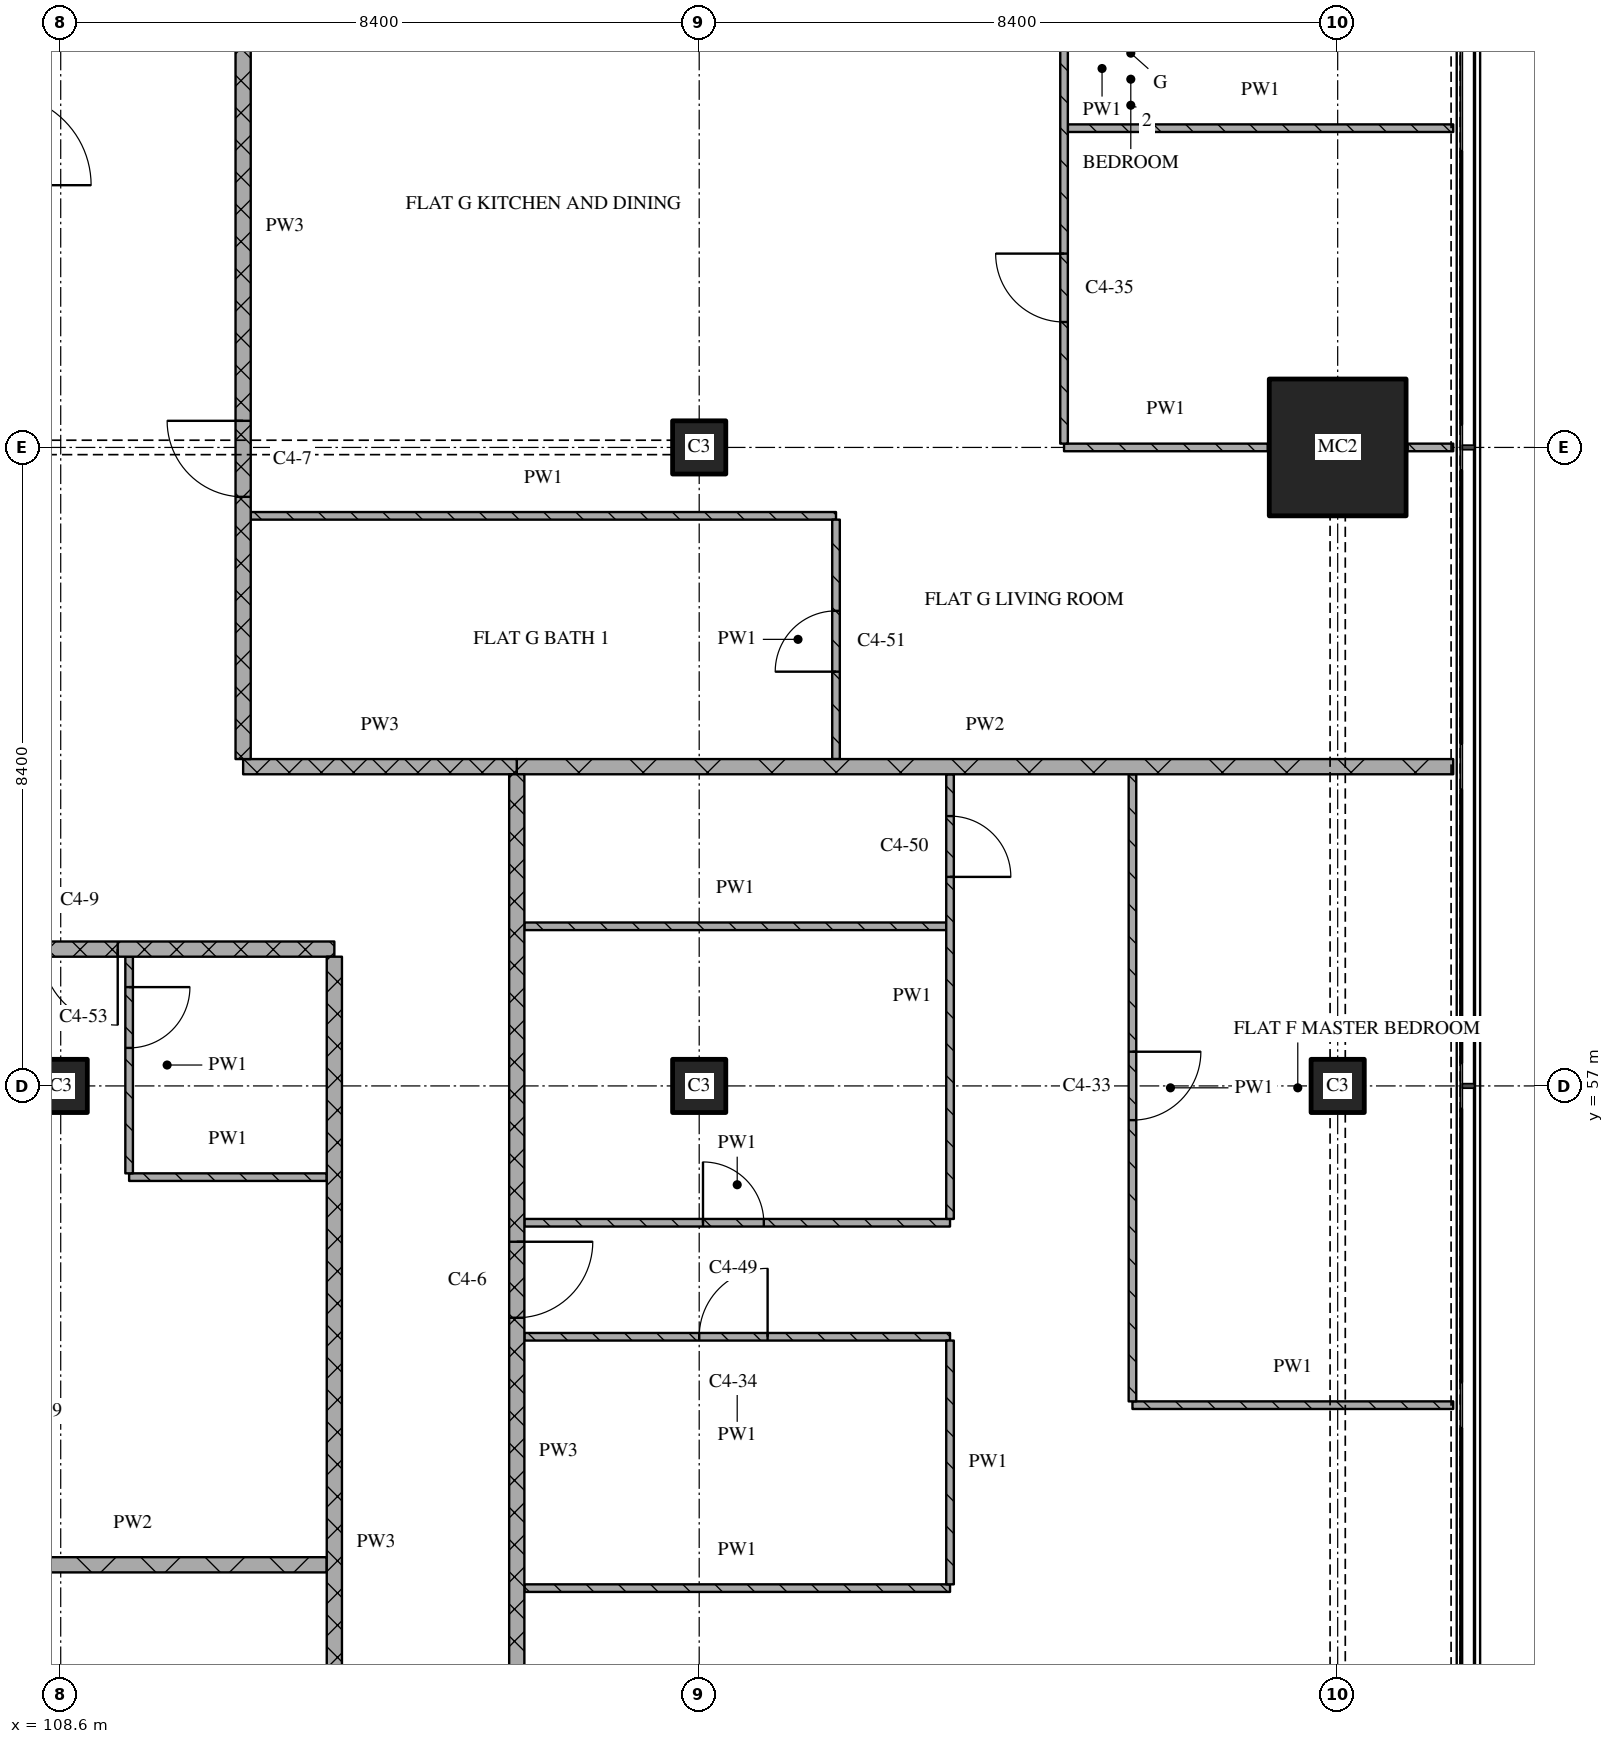
"""IFC4 building model, lengths in metres.
Left out: names, types, materials, properties, quantities, classifications, styles, units other than length and angle.
Written with IfcOpenShell. Run it as: python <this file> out.ifc"""

import sys

from ifc_helpers import new_model, si_unit, direction, frame, frame_2d, origin, origin_2d, place, context, subcontext, project, spatial, rectangle, extrude, element, fill, save


model = new_model("IFC4")
c1 = context("Model", 3, precision=1e-05, world=origin(), true_north=direction((0.0, 1.0)))
c2 = subcontext(c1, "Body", "Model", "MODEL_VIEW")
j1 = project(units=[si_unit("LENGTHUNIT", "METRE"), si_unit("PLANEANGLEUNIT", "RADIAN")], contexts=[c1])
p1 = place(None, origin())
s1 = spatial("IfcSite", under=j1, at=p1, CompositionType="ELEMENT")
p2 = place(p1, origin())
s2 = spatial("IfcBuilding", under=s1, at=p2, CompositionType="ELEMENT")
p3 = place(p2, frame((0.0, 0.0, 187.05)))
s3 = spatial("IfcBuildingStorey", under=s2, at=p3, CompositionType="ELEMENT", Elevation=187.05)
for number, where, z_axis, x_axis in (
    (1, (108.6, 57.0, 0.0), (0.0, 0.0, 1.0), (1.0, 0.0, 0.0)),
    (2, (117.0, 57.0, 0.0), (0.0, 0.0, 1.0), (1.0, 0.0, 0.0)),
    (3, (117.0, 65.4, 0.0), (0.0, 0.0, 1.0), (1.0, 0.0, 0.0)),
    (4, (125.4, 57.0, 0.0), (0.0, 0.0, 1.0), (1.0, 0.0, 0.0)),
):
    element("IfcColumn", number, at=place(p3, frame(where, z_axis=z_axis, x_axis=x_axis)), inside=s3, PredefinedType="COLUMN", context=c2, shape_type="SweptSolid", body=[
        extrude(rectangle(XDim=0.7, YDim=0.7, at=origin_2d()), origin(), (0.0, 0.0, 1.0), 3.6),
    ])
p4 = place(p3, frame((125.4, 65.4, 0.0), z_axis=(0.0, 0.0, 1.0), x_axis=(1.0, 0.0, 0.0)))
e5 = element("IfcColumn", 5, at=p4, inside=s3, PredefinedType="COLUMN", context=c2, shape_type="SweptSolid", body=[
    extrude(rectangle(XDim=1.8, YDim=1.8, at=origin_2d()), origin(), (0.0, 0.0, 1.0), 3.6),
])
p5 = place(p3, frame((114.7, 50.393, 0.0), z_axis=(0.0, 0.0, 1.0), x_axis=(1.0, 0.0, 0.0)))
e6 = element("IfcWall", 6, at=p5, inside=s3, PredefinedType="PARTITIONING", context=c2, shape_type="SweptSolid", body=[
    extrude(rectangle(XDim=5.6, YDim=0.1, at=frame_2d((2.8, 0.0))), origin(), (0.0, 0.0, 1.0), 3.32),
])
p6 = place(p3, frame((107.0, 50.7, 0.0), z_axis=(0.0, 0.0, 1.0), x_axis=(1.0, 0.0, 0.0)))
e7 = element("IfcWall", 7, at=p6, inside=s3, PredefinedType="PARTITIONING", context=c2, shape_type="SweptSolid", body=[
    extrude(rectangle(XDim=5.1, YDim=0.2, at=frame_2d((2.55, 0.0))), origin(), (0.0, 0.0, 1.0), 3.32),
])
p7 = place(p3, frame((122.7, 52.8, 0.0), z_axis=(0.0, 0.0, 1.0), x_axis=(1.0, 0.0, 0.0)))
e8 = element("IfcWall", 8, at=p7, inside=s3, PredefinedType="PARTITIONING", context=c2, shape_type="SweptSolid", body=[
    extrude(rectangle(XDim=4.22, YDim=0.1, at=frame_2d((2.11, 0.0))), origin(), (0.0, 0.0, 1.0), 3.32),
])
p8 = place(p3, frame((120.3, 53.7, 0.0), z_axis=(0.0, 0.0, 1.0), x_axis=(-1.0, 0.0, 0.0)))
e9 = element("IfcWall", 9, at=p8, inside=s3, PredefinedType="PARTITIONING", context=c2, shape_type="SweptSolid", body=[
    extrude(rectangle(XDim=5.6, YDim=0.1, at=frame_2d((2.8, 0.0))), origin(), (0.0, 0.0, 1.0), 3.32),
])
p9 = place(p8, frame((2.4, 0.0, 0.0)))
e10 = element("IfcOpeningElement", 10, at=p9, cuts=e9, PredefinedType="OPENING", context=c2, shape_type="SweptSolid", body=[
    extrude(rectangle(XDim=0.9, YDim=2.1, at=frame_2d((0.45, 1.05))), frame((0.0, 0.06, 0.0), z_axis=(0.0, -1.0, 0.0), x_axis=(1.0, 0.0, 0.0)), (0.0, 0.0, 1.0), 0.12),
])
p10 = place(p3, frame((114.7, 55.2, 0.0), z_axis=(0.0, 0.0, 1.0), x_axis=(1.0, 0.0, 0.0)))
e11 = element("IfcWall", 11, at=p10, inside=s3, PredefinedType="PARTITIONING", context=c2, shape_type="SweptSolid", body=[
    extrude(rectangle(XDim=5.6, YDim=0.1, at=frame_2d((2.8, 0.0))), origin(), (0.0, 0.0, 1.0), 3.32),
])
p11 = place(p10, frame((2.35, 0.0, 0.0)))
e12 = element("IfcOpeningElement", 12, at=p11, cuts=e11, PredefinedType="OPENING", context=c2, shape_type="SweptSolid", body=[
    extrude(rectangle(XDim=0.8, YDim=2.1, at=frame_2d((0.4, 1.05))), frame((0.0, 0.06, 0.0), z_axis=(0.0, -1.0, 0.0), x_axis=(1.0, 0.0, 0.0)), (0.0, 0.0, 1.0), 0.12),
])
p12 = place(p3, frame((109.5, 55.8, 0.0), z_axis=(0.0, 0.0, 1.0), x_axis=(1.0, 0.0, 0.0)))
e13 = element("IfcWall", 13, at=p12, inside=s3, PredefinedType="PARTITIONING", context=c2, shape_type="SweptSolid", body=[
    extrude(rectangle(XDim=2.6, YDim=0.1, at=frame_2d((1.3, 0.0))), origin(), (0.0, 0.0, 1.0), 3.32),
])
p13 = place(p3, frame((112.2, 58.8, 0.0), z_axis=(0.0, 0.0, 1.0), x_axis=(-1.0, 0.0, 0.0)))
e14 = element("IfcWall", 14, at=p13, inside=s3, PredefinedType="PARTITIONING", context=c2, shape_type="SweptSolid", body=[
    extrude(rectangle(XDim=10.8, YDim=0.2, at=frame_2d((5.4, 0.0))), origin(), (0.0, 0.0, 1.0), 3.32),
])
p14 = place(p13, frame((2.85, 0.0, 0.0)))
e15 = element("IfcOpeningElement", 15, at=p14, cuts=e14, PredefinedType="OPENING", context=c2, shape_type="SweptSolid", body=[
    extrude(rectangle(XDim=1.0, YDim=2.1, at=frame_2d((0.5, 1.05))), frame((0.0, 0.11, 0.0), z_axis=(0.0, -1.0, 0.0), x_axis=(1.0, 0.0, 0.0)), (0.0, 0.0, 1.0), 0.22),
])
p15 = place(p3, frame((114.7, 59.1, 0.0), z_axis=(0.0, 0.0, 1.0), x_axis=(1.0, 0.0, 0.0)))
e16 = element("IfcWall", 16, at=p15, inside=s3, PredefinedType="PARTITIONING", context=c2, shape_type="SweptSolid", body=[
    extrude(rectangle(XDim=5.55, YDim=0.1, at=frame_2d((2.775, 0.0))), origin(), (0.0, 0.0, 1.0), 3.32),
])
p16 = place(p3, frame((111.0, 61.2, 0.0), z_axis=(0.0, 0.0, 1.0), x_axis=(1.0, 0.0, 0.0)))
e17 = element("IfcWall", 17, at=p16, inside=s3, PredefinedType="PARTITIONING", context=c2, shape_type="SweptSolid", body=[
    extrude(rectangle(XDim=3.6, YDim=0.2, at=frame_2d((1.8, 0.0))), origin(), (0.0, 0.0, 1.0), 3.32),
])
p17 = place(p3, frame((114.6, 61.2, 0.0), z_axis=(0.0, 0.0, 1.0), x_axis=(1.0, 0.0, 0.0)))
e18 = element("IfcWall", 18, at=p17, inside=s3, PredefinedType="PARTITIONING", context=c2, shape_type="SweptSolid", body=[
    extrude(rectangle(XDim=12.32, YDim=0.2, at=frame_2d((6.16, 0.0))), origin(), (0.0, 0.0, 1.0), 3.32),
])
p18 = place(p3, frame((111.1, 64.5, 0.0), z_axis=(0.0, 0.0, 1.0), x_axis=(1.0, 0.0, 0.0)))
e19 = element("IfcWall", 19, at=p18, inside=s3, PredefinedType="PARTITIONING", context=c2, shape_type="SweptSolid", body=[
    extrude(rectangle(XDim=7.7, YDim=0.1, at=frame_2d((3.85, 0.0))), origin(), (0.0, 0.0, 1.0), 3.32),
])
p19 = place(p3, frame((121.8, 65.4, 0.0), z_axis=(0.0, 0.0, 1.0), x_axis=(1.0, 0.0, 0.0)))
e20 = element("IfcWall", 20, at=p19, inside=s3, PredefinedType="PARTITIONING", context=c2, shape_type="SweptSolid", body=[
    extrude(rectangle(XDim=2.68, YDim=0.1, at=frame_2d((1.34, 0.0))), origin(), (0.0, 0.0, 1.0), 3.32),
])
p20 = place(p3, frame((126.32, 65.4, 0.0), z_axis=(0.0, 0.0, 1.0), x_axis=(1.0, 0.0, 0.0)))
e21 = element("IfcWall", 21, at=p20, inside=s3, PredefinedType="PARTITIONING", context=c2, shape_type="SweptSolid", body=[
    extrude(rectangle(XDim=0.6, YDim=0.1, at=frame_2d((0.3, 0.0))), origin(), (0.0, 0.0, 1.0), 3.32),
])
p21 = place(p3, frame((121.85, 69.6, 0.0), z_axis=(0.0, 0.0, 1.0), x_axis=(1.0, 0.0, 0.0)))
e22 = element("IfcWall", 22, at=p21, inside=s3, PredefinedType="PARTITIONING", context=c2, shape_type="SweptSolid", body=[
    extrude(rectangle(XDim=5.07, YDim=0.1, at=frame_2d((2.535, 0.0))), origin(), (0.0, 0.0, 1.0), 3.32),
])
p22 = place(p3, frame((109.5, 58.7, 0.0), z_axis=(0.0, 0.0, 1.0), x_axis=(0.0, -1.0, 0.0)))
e23 = element("IfcWall", 23, at=p22, inside=s3, PredefinedType="PARTITIONING", context=c2, shape_type="SweptSolid", body=[
    extrude(rectangle(XDim=2.85, YDim=0.1, at=frame_2d((1.425, 0.0))), origin(), (0.0, 0.0, 1.0), 3.32),
])
p23 = place(p22, frame((0.4, 0.0, 0.0)))
e24 = element("IfcOpeningElement", 24, at=p23, cuts=e23, PredefinedType="OPENING", context=c2, shape_type="SweptSolid", body=[
    extrude(rectangle(XDim=0.8, YDim=2.1, at=frame_2d((0.4, 1.05))), frame((0.0, 0.06, 0.0), z_axis=(0.0, -1.0, 0.0), x_axis=(1.0, 0.0, 0.0)), (0.0, 0.0, 1.0), 0.12),
])
p24 = place(p3, frame((111.0, 75.32, 0.0), z_axis=(0.0, 0.0, 1.0), x_axis=(0.0, -1.0, 0.0)))
e25 = element("IfcWall", 25, at=p24, inside=s3, PredefinedType="PARTITIONING", context=c2, shape_type="SweptSolid", body=[
    extrude(rectangle(XDim=14.02, YDim=0.2, at=frame_2d((7.01, 0.0))), origin(), (0.0, 0.0, 1.0), 3.32),
])
p25 = place(p24, frame((9.57, 0.0, 0.0)))
e26 = element("IfcOpeningElement", 26, at=p25, cuts=e25, PredefinedType="OPENING", context=c2, shape_type="SweptSolid", body=[
    extrude(rectangle(XDim=1.0, YDim=2.1, at=frame_2d((0.5, 1.05))), frame((0.0, 0.11, 0.0), z_axis=(0.0, -1.0, 0.0), x_axis=(1.0, 0.0, 0.0)), (0.0, 0.0, 1.0), 0.22),
])
p26 = place(p3, frame((112.2, 58.7, 0.0), z_axis=(0.0, 0.0, 1.0), x_axis=(0.0, -1.0, 0.0)))
e27 = element("IfcWall", 27, at=p26, inside=s3, PredefinedType="PARTITIONING", context=c2, shape_type="SweptSolid", body=[
    extrude(rectangle(XDim=15.4, YDim=0.2, at=frame_2d((7.7, 0.0))), origin(), (0.0, 0.0, 1.0), 3.32),
])
p27 = place(p3, frame((114.6, 61.1, 0.0), z_axis=(0.0, 0.0, 1.0), x_axis=(0.0, -1.0, 0.0)))
e28 = element("IfcWall", 28, at=p27, inside=s3, PredefinedType="PARTITIONING", context=c2, shape_type="SweptSolid", body=[
    extrude(rectangle(XDim=17.8, YDim=0.2, at=frame_2d((8.9, 0.0))), origin(), (0.0, 0.0, 1.0), 3.32),
])
p28 = place(p27, frame((6.15, 0.0, 0.0)))
e29 = element("IfcOpeningElement", 29, at=p28, cuts=e28, PredefinedType="OPENING", context=c2, shape_type="SweptSolid", body=[
    extrude(rectangle(XDim=1.0, YDim=2.1, at=frame_2d((0.5, 1.05))), frame((0.0, 0.11, 0.0), z_axis=(0.0, -1.0, 0.0), x_axis=(1.0, 0.0, 0.0)), (0.0, 0.0, 1.0), 0.22),
])
p29 = place(p3, frame((118.8, 61.3, 0.0), z_axis=(0.0, 0.0, 1.0), x_axis=(0.0, 1.0, 0.0)))
e30 = element("IfcWall", 30, at=p29, inside=s3, PredefinedType="PARTITIONING", context=c2, shape_type="SweptSolid", body=[
    extrude(rectangle(XDim=3.15, YDim=0.1, at=frame_2d((1.575, 0.0))), origin(), (0.0, 0.0, 1.0), 3.32),
])
p30 = place(p29, frame((1.15, 0.0, 0.0)))
e31 = element("IfcOpeningElement", 31, at=p30, cuts=e30, PredefinedType="OPENING", context=c2, shape_type="SweptSolid", body=[
    extrude(rectangle(XDim=0.8, YDim=2.1, at=frame_2d((0.4, 1.05))), frame((0.0, 0.06, 0.0), z_axis=(0.0, -1.0, 0.0), x_axis=(1.0, 0.0, 0.0)), (0.0, 0.0, 1.0), 0.12),
])
p31 = place(p3, frame((120.3, 53.65, 0.0), z_axis=(0.0, 0.0, 1.0), x_axis=(0.0, -1.0, 0.0)))
e32 = element("IfcWall", 32, at=p31, inside=s3, PredefinedType="PARTITIONING", context=c2, shape_type="SweptSolid", body=[
    extrude(rectangle(XDim=3.207, YDim=0.1, at=frame_2d((1.604, 0.0))), origin(), (0.0, 0.0, 1.0), 3.32),
])
p32 = place(p3, frame((120.3, 55.25, 0.0), z_axis=(0.0, 0.0, 1.0), x_axis=(0.0, 1.0, 0.0)))
e33 = element("IfcWall", 33, at=p32, inside=s3, PredefinedType="PARTITIONING", context=c2, shape_type="SweptSolid", body=[
    extrude(rectangle(XDim=5.85, YDim=0.1, at=frame_2d((2.925, 0.0))), origin(), (0.0, 0.0, 1.0), 3.32),
])
p33 = place(p32, frame((4.5, 0.0, 0.0)))
e34 = element("IfcOpeningElement", 34, at=p33, cuts=e33, PredefinedType="OPENING", context=c2, shape_type="SweptSolid", body=[
    extrude(rectangle(XDim=0.8, YDim=2.1, at=frame_2d((0.4, 1.05))), frame((0.0, 0.06, 0.0), z_axis=(0.0, -1.0, 0.0), x_axis=(1.0, 0.0, 0.0)), (0.0, 0.0, 1.0), 0.12),
])
p34 = place(p3, frame((121.8, 75.32, 0.0), z_axis=(0.0, 0.0, 1.0), x_axis=(0.0, -1.0, 0.0)))
e35 = element("IfcWall", 35, at=p34, inside=s3, PredefinedType="PARTITIONING", context=c2, shape_type="SweptSolid", body=[
    extrude(rectangle(XDim=9.87, YDim=0.1, at=frame_2d((4.935, 0.0))), origin(), (0.0, 0.0, 1.0), 3.32),
])
p35 = place(p34, frame((3.346, 0.0, 0.0)))
e36 = element("IfcOpeningElement", 36, at=p35, cuts=e35, PredefinedType="OPENING", context=c2, shape_type="SweptSolid", body=[
    extrude(rectangle(XDim=0.9, YDim=2.1, at=frame_2d((0.45, 1.05))), frame((0.0, 0.06, 0.0), z_axis=(0.0, -1.0, 0.0), x_axis=(1.0, 0.0, 0.0)), (0.0, 0.0, 1.0), 0.12),
])
p36 = place(p34, frame((7.37, 0.0, 0.0)))
e37 = element("IfcOpeningElement", 37, at=p36, cuts=e35, PredefinedType="OPENING", context=c2, shape_type="SweptSolid", body=[
    extrude(rectangle(XDim=0.9, YDim=2.1, at=frame_2d((0.45, 1.05))), frame((0.0, 0.06, 0.0), z_axis=(0.0, -1.0, 0.0), x_axis=(1.0, 0.0, 0.0)), (0.0, 0.0, 1.0), 0.12),
])
p37 = place(p3, frame((122.7, 61.1, 0.0), z_axis=(0.0, 0.0, 1.0), x_axis=(0.0, -1.0, 0.0)))
e38 = element("IfcWall", 38, at=p37, inside=s3, PredefinedType="PARTITIONING", context=c2, shape_type="SweptSolid", body=[
    extrude(rectangle(XDim=8.25, YDim=0.1, at=frame_2d((4.125, 0.0))), origin(), (0.0, 0.0, 1.0), 3.32),
])
p38 = place(p37, frame((3.65, 0.0, 0.0)))
e39 = element("IfcOpeningElement", 39, at=p38, cuts=e38, PredefinedType="OPENING", context=c2, shape_type="SweptSolid", body=[
    extrude(rectangle(XDim=0.9, YDim=2.1, at=frame_2d((0.45, 1.05))), frame((0.0, 0.06, 0.0), z_axis=(0.0, -1.0, 0.0), x_axis=(1.0, 0.0, 0.0)), (0.0, 0.0, 1.0), 0.12),
])
p39 = place(p9, origin())
e40 = element("IfcDoor", 40, at=p39, inside=s3, OperationType="SINGLE_SWING_RIGHT", PredefinedType="DOOR", context=c2, shape_type="SweptSolid", body=[
    extrude(rectangle(XDim=0.9, YDim=2.1, at=frame_2d((0.45, 1.05))), frame((0.0, 0.025, 0.0), z_axis=(0.0, -1.0, 0.0), x_axis=(1.0, 0.0, 0.0)), (0.0, 0.0, 1.0), 0.05),
])
fill(e10, e40)
p40 = place(p11, origin())
e41 = element("IfcDoor", 41, at=p40, inside=s3, OperationType="SINGLE_SWING_LEFT", PredefinedType="DOOR", context=c2, shape_type="SweptSolid", body=[
    extrude(rectangle(XDim=0.8, YDim=2.1, at=frame_2d((0.4, 1.05))), frame((0.0, 0.025, 0.0), z_axis=(0.0, -1.0, 0.0), x_axis=(1.0, 0.0, 0.0)), (0.0, 0.0, 1.0), 0.05),
])
fill(e12, e41)
p41 = place(p14, origin())
e42 = element("IfcDoor", 42, at=p41, inside=s3, OperationType="SINGLE_SWING_LEFT", PredefinedType="DOOR", context=c2, shape_type="SweptSolid", body=[
    extrude(rectangle(XDim=1.0, YDim=2.1, at=frame_2d((0.5, 1.05))), frame((0.0, 0.025, 0.0), z_axis=(0.0, -1.0, 0.0), x_axis=(1.0, 0.0, 0.0)), (0.0, 0.0, 1.0), 0.05),
])
fill(e15, e42)
p42 = place(p23, origin())
e43 = element("IfcDoor", 43, at=p42, inside=s3, OperationType="SINGLE_SWING_LEFT", PredefinedType="DOOR", context=c2, shape_type="SweptSolid", body=[
    extrude(rectangle(XDim=0.8, YDim=2.1, at=frame_2d((0.4, 1.05))), frame((0.0, 0.025, 0.0), z_axis=(0.0, -1.0, 0.0), x_axis=(1.0, 0.0, 0.0)), (0.0, 0.0, 1.0), 0.05),
])
fill(e24, e43)
p43 = place(p25, origin())
e44 = element("IfcDoor", 44, at=p43, inside=s3, OperationType="SINGLE_SWING_RIGHT", PredefinedType="DOOR", context=c2, shape_type="SweptSolid", body=[
    extrude(rectangle(XDim=1.0, YDim=2.1, at=frame_2d((0.5, 1.05))), frame((0.0, 0.025, 0.0), z_axis=(0.0, -1.0, 0.0), x_axis=(1.0, 0.0, 0.0)), (0.0, 0.0, 1.0), 0.05),
])
fill(e26, e44)
p44 = place(p28, origin())
e45 = element("IfcDoor", 45, at=p44, inside=s3, OperationType="SINGLE_SWING_LEFT", PredefinedType="DOOR", context=c2, shape_type="SweptSolid", body=[
    extrude(rectangle(XDim=1.0, YDim=2.1, at=frame_2d((0.5, 1.05))), frame((0.0, 0.025, 0.0), z_axis=(0.0, -1.0, 0.0), x_axis=(1.0, 0.0, 0.0)), (0.0, 0.0, 1.0), 0.05),
])
fill(e29, e45)
p45 = place(p30, origin())
e46 = element("IfcDoor", 46, at=p45, inside=s3, OperationType="SINGLE_SWING_LEFT", PredefinedType="DOOR", context=c2, shape_type="SweptSolid", body=[
    extrude(rectangle(XDim=0.8, YDim=2.1, at=frame_2d((0.4, 1.05))), frame((0.0, 0.025, 0.0), z_axis=(0.0, -1.0, 0.0), x_axis=(1.0, 0.0, 0.0)), (0.0, 0.0, 1.0), 0.05),
])
fill(e31, e46)
p46 = place(p33, origin())
e47 = element("IfcDoor", 47, at=p46, inside=s3, OperationType="SINGLE_SWING_RIGHT", PredefinedType="DOOR", context=c2, shape_type="SweptSolid", body=[
    extrude(rectangle(XDim=0.8, YDim=2.1, at=frame_2d((0.4, 1.05))), frame((0.0, 0.025, 0.0), z_axis=(0.0, -1.0, 0.0), x_axis=(1.0, 0.0, 0.0)), (0.0, 0.0, 1.0), 0.05),
])
fill(e34, e47)
p47 = place(p36, origin())
e48 = element("IfcDoor", 48, at=p47, inside=s3, OperationType="SINGLE_SWING_RIGHT", PredefinedType="DOOR", context=c2, shape_type="SweptSolid", body=[
    extrude(rectangle(XDim=0.9, YDim=2.1, at=frame_2d((0.45, 1.05))), frame((0.0, 0.025, 0.0), z_axis=(0.0, -1.0, 0.0), x_axis=(1.0, 0.0, 0.0)), (0.0, 0.0, 1.0), 0.05),
])
fill(e37, e48)
p48 = place(p38, origin())
e49 = element("IfcDoor", 49, at=p48, inside=s3, OperationType="SINGLE_SWING_LEFT", PredefinedType="DOOR", context=c2, shape_type="SweptSolid", body=[
    extrude(rectangle(XDim=0.9, YDim=2.1, at=frame_2d((0.45, 1.05))), frame((0.0, 0.025, 0.0), z_axis=(0.0, -1.0, 0.0), x_axis=(1.0, 0.0, 0.0)), (0.0, 0.0, 1.0), 0.05),
])
fill(e39, e49)
save(model, sys.argv[1])
